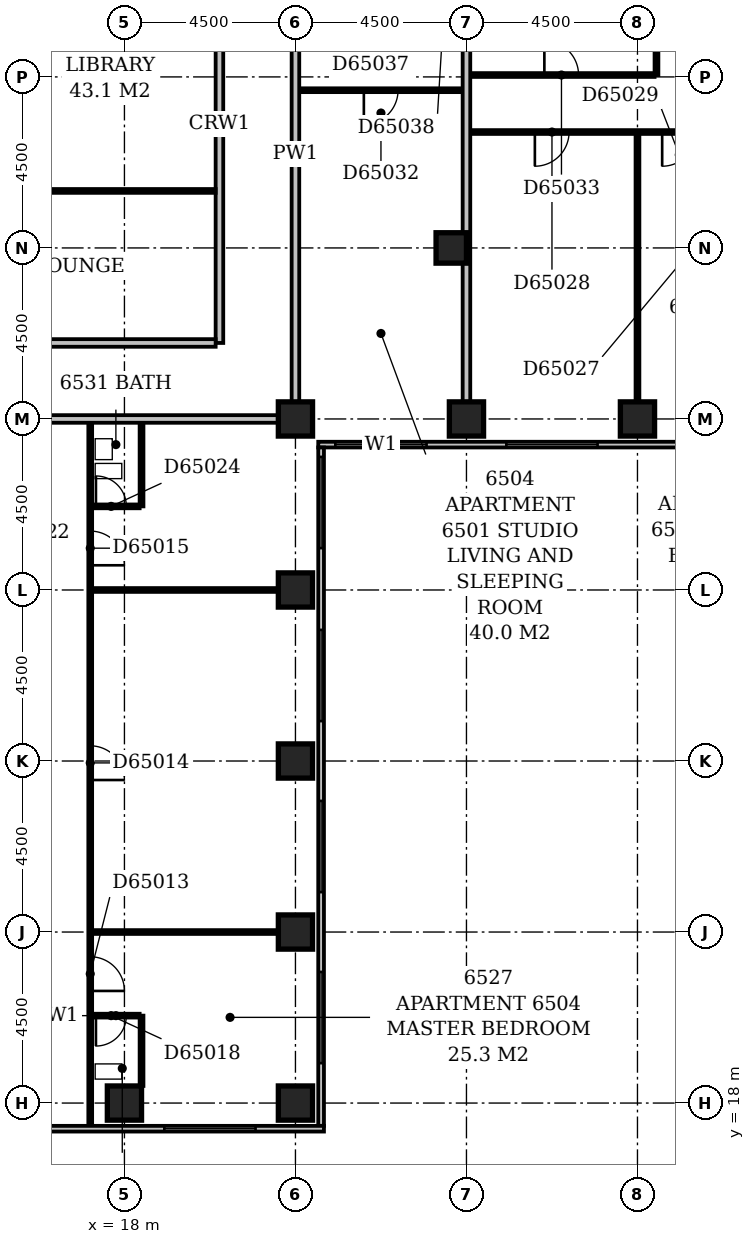
"""IFC4 building model, lengths in metres.
Left out: names, types, materials, properties, quantities, classifications, styles, units other than length and angle.
Written with IfcOpenShell. Run it as: python <this file> out.ifc"""

import sys

from ifc_helpers import new_model, si_unit, direction, frame, frame_2d, origin, origin_2d, place, context, subcontext, project, spatial, rectangle, extrude, element, fill, save


model = new_model("IFC4")
c1 = context("Model", 3, precision=1e-05, world=origin(), true_north=direction((0.0, 1.0)))
c2 = subcontext(c1, "Body", "Model", "MODEL_VIEW")
j1 = project(units=[si_unit("LENGTHUNIT", "METRE"), si_unit("PLANEANGLEUNIT", "RADIAN")], contexts=[c1])
p1 = place(None, origin())
s1 = spatial("IfcSite", under=j1, at=p1, CompositionType="ELEMENT")
p2 = place(p1, origin())
s2 = spatial("IfcBuilding", under=s1, at=p2, CompositionType="ELEMENT")
p3 = place(p2, frame((0.0, 0.0, 251.0)))
s3 = spatial("IfcBuildingStorey", under=s2, at=p3, CompositionType="ELEMENT", Elevation=251.0)
for number, where, z_axis, x_axis in (
    (1, (18.0, 18.0, -0.3), (0.0, 0.0, 1.0), (1.0, 0.0, 0.0)),
    (2, (22.5, 18.0, -0.3), (0.0, 0.0, 1.0), (1.0, 0.0, 0.0)),
    (3, (22.5, 22.5, -0.3), (0.0, 0.0, 1.0), (1.0, 0.0, 0.0)),
    (4, (22.5, 27.0, -0.3), (0.0, 0.0, 1.0), (1.0, 0.0, 0.0)),
    (5, (22.5, 31.5, -0.3), (0.0, 0.0, 1.0), (1.0, 0.0, 0.0)),
    (6, (22.5, 36.0, -0.3), (0.0, 0.0, 1.0), (1.0, 0.0, 0.0)),
    (7, (27.0, 36.0, -0.3), (0.0, 0.0, 1.0), (1.0, 0.0, 0.0)),
    (8, (31.5, 36.0, -0.3), (0.0, 0.0, 1.0), (1.0, 0.0, 0.0)),
):
    element("IfcColumn", number, at=place(p3, frame(where, z_axis=z_axis, x_axis=x_axis)), inside=s3, PredefinedType="COLUMN", context=c2, shape_type="SweptSolid", body=[
        extrude(rectangle(XDim=0.9, YDim=0.9, at=origin_2d()), origin(), (0.0, 0.0, 1.0), 3.6),
    ])
p4 = place(p3, frame((26.6, 40.5, -0.3), z_axis=(0.0, 0.0, 1.0), x_axis=(1.0, 0.0, 0.0)))
e9 = element("IfcColumn", 9, at=p4, inside=s3, PredefinedType="COLUMN", context=c2, shape_type="SweptSolid", body=[
    extrude(rectangle(XDim=0.8, YDim=0.8, at=origin_2d()), origin(), (0.0, 0.0, 1.0), 3.6),
])
p5 = place(p3, frame((3.9, 17.325, 0.0), z_axis=(0.0, 0.0, 1.0), x_axis=(1.0, 0.0, 0.0)))
e10 = element("IfcWall", 10, at=p5, inside=s3, PredefinedType="STANDARD", context=c2, shape_type="SweptSolid", body=[
    extrude(rectangle(XDim=19.35, YDim=0.15, at=frame_2d((9.675, 0.0))), origin(), (0.0, 0.0, 1.0), 2.7),
])
p6 = place(p5, frame((6.15, 0.0, 0.6)))
e11 = element("IfcOpeningElement", 11, at=p6, cuts=e10, PredefinedType="OPENING", context=c2, shape_type="SweptSolid", body=[
    extrude(rectangle(XDim=2.4, YDim=1.8, at=frame_2d((1.2, 0.9))), frame((0.0, 0.087, 0.0), z_axis=(0.0, -1.0, 0.0), x_axis=(1.0, 0.0, 0.0)), (0.0, 0.0, 1.0), 0.174),
])
p7 = place(p5, frame((15.15, 0.0, 0.6)))
e12 = element("IfcOpeningElement", 12, at=p7, cuts=e10, PredefinedType="OPENING", context=c2, shape_type="SweptSolid", body=[
    extrude(rectangle(XDim=2.4, YDim=1.8, at=frame_2d((1.2, 0.9))), frame((0.0, 0.087, 0.0), z_axis=(0.0, -1.0, 0.0), x_axis=(1.0, 0.0, 0.0)), (0.0, 0.0, 1.0), 0.174),
])
p8 = place(p3, frame((23.175, 17.4, 0.0), z_axis=(0.0, 0.0, 1.0), x_axis=(0.0, 1.0, 0.0)))
e13 = element("IfcWall", 13, at=p8, inside=s3, PredefinedType="STANDARD", context=c2, shape_type="SweptSolid", body=[
    extrude(rectangle(XDim=17.85, YDim=0.15, at=frame_2d((8.925, 0.0))), origin(), (0.0, 0.0, 1.0), 2.7),
])
p9 = place(p8, frame((1.65, 0.0, 0.6)))
e14 = element("IfcOpeningElement", 14, at=p9, cuts=e13, PredefinedType="OPENING", context=c2, shape_type="SweptSolid", body=[
    extrude(rectangle(XDim=2.4, YDim=1.8, at=frame_2d((1.2, 0.9))), frame((0.0, 0.087, 0.0), z_axis=(0.0, -1.0, 0.0), x_axis=(1.0, 0.0, 0.0)), (0.0, 0.0, 1.0), 0.174),
])
p10 = place(p8, frame((6.15, 0.0, 0.6)))
e15 = element("IfcOpeningElement", 15, at=p10, cuts=e13, PredefinedType="OPENING", context=c2, shape_type="SweptSolid", body=[
    extrude(rectangle(XDim=2.4, YDim=1.8, at=frame_2d((1.2, 0.9))), frame((0.0, 0.087, 0.0), z_axis=(0.0, -1.0, 0.0), x_axis=(1.0, 0.0, 0.0)), (0.0, 0.0, 1.0), 0.174),
])
p11 = place(p8, frame((10.65, 0.0, 0.6)))
e16 = element("IfcOpeningElement", 16, at=p11, cuts=e13, PredefinedType="OPENING", context=c2, shape_type="SweptSolid", body=[
    extrude(rectangle(XDim=2.4, YDim=1.8, at=frame_2d((1.2, 0.9))), frame((0.0, 0.087, 0.0), z_axis=(0.0, -1.0, 0.0), x_axis=(1.0, 0.0, 0.0)), (0.0, 0.0, 1.0), 0.174),
])
p12 = place(p8, frame((15.202, 0.0, 0.6)))
e17 = element("IfcOpeningElement", 17, at=p12, cuts=e13, PredefinedType="OPENING", context=c2, shape_type="SweptSolid", body=[
    extrude(rectangle(XDim=2.4, YDim=1.8, at=frame_2d((1.2, 0.9))), frame((0.0, 0.087, 0.0), z_axis=(0.0, -1.0, 0.0), x_axis=(1.0, 0.0, 0.0)), (0.0, 0.0, 1.0), 0.174),
])
p13 = place(p3, frame((23.1, 35.325, 0.0), z_axis=(0.0, 0.0, 1.0), x_axis=(1.0, 0.0, 0.0)))
e18 = element("IfcWall", 18, at=p13, inside=s3, PredefinedType="STANDARD", context=c2, shape_type="SweptSolid", body=[
    extrude(rectangle(XDim=18.15, YDim=0.15, at=frame_2d((9.075, 0.0))), origin(), (0.0, 0.0, 1.0), 2.7),
])
p14 = place(p13, frame((0.45, 0.0, 0.6)))
e19 = element("IfcOpeningElement", 19, at=p14, cuts=e18, PredefinedType="OPENING", context=c2, shape_type="SweptSolid", body=[
    extrude(rectangle(XDim=2.4, YDim=1.8, at=frame_2d((1.2, 0.9))), frame((0.0, 0.087, 0.0), z_axis=(0.0, -1.0, 0.0), x_axis=(1.0, 0.0, 0.0)), (0.0, 0.0, 1.0), 0.174),
])
p15 = place(p13, frame((4.95, 0.0, 0.6)))
e20 = element("IfcOpeningElement", 20, at=p15, cuts=e18, PredefinedType="OPENING", context=c2, shape_type="SweptSolid", body=[
    extrude(rectangle(XDim=2.4, YDim=1.8, at=frame_2d((1.2, 0.9))), frame((0.0, 0.087, 0.0), z_axis=(0.0, -1.0, 0.0), x_axis=(1.0, 0.0, 0.0)), (0.0, 0.0, 1.0), 0.174),
])
p16 = place(p13, frame((9.45, 0.0, 0.6)))
e21 = element("IfcOpeningElement", 21, at=p16, cuts=e18, PredefinedType="OPENING", context=c2, shape_type="SweptSolid", body=[
    extrude(rectangle(XDim=2.4, YDim=1.8, at=frame_2d((1.2, 0.9))), frame((0.0, 0.087, 0.0), z_axis=(0.0, -1.0, 0.0), x_axis=(1.0, 0.0, 0.0)), (0.0, 0.0, 1.0), 0.174),
])
p17 = place(p13, frame((14.931, 0.0, 0.6)))
e22 = element("IfcOpeningElement", 22, at=p17, cuts=e18, PredefinedType="OPENING", context=c2, shape_type="SweptSolid", body=[
    extrude(rectangle(XDim=1.8, YDim=1.8, at=frame_2d((0.9, 0.9))), frame((0.0, 0.087, 0.0), z_axis=(0.0, -1.0, 0.0), x_axis=(1.0, 0.0, 0.0)), (0.0, 0.0, 1.0), 0.174),
])
p18 = place(p3, frame((17.1, 17.4, 0.0), z_axis=(0.0, 0.0, 1.0), x_axis=(0.0, 1.0, 0.0)))
e23 = element("IfcWall", 23, at=p18, inside=s3, PredefinedType="PARTITIONING", context=c2, shape_type="SweptSolid", body=[
    extrude(rectangle(XDim=18.5, YDim=0.1, at=frame_2d((9.25, 0.0))), origin(), (0.0, 0.0, 1.0), 3.3),
])
p19 = place(p18, frame((3.55, 0.0, 0.0)))
e24 = element("IfcOpeningElement", 24, at=p19, cuts=e23, PredefinedType="OPENING", context=c2, shape_type="SweptSolid", body=[
    extrude(rectangle(XDim=0.9, YDim=2.1, at=frame_2d((0.45, 1.05))), frame((0.0, 0.062, 0.0), z_axis=(0.0, -1.0, 0.0), x_axis=(1.0, 0.0, 0.0)), (0.0, 0.0, 1.0), 0.124),
])
p20 = place(p18, frame((9.1, 0.0, 0.0)))
e25 = element("IfcOpeningElement", 25, at=p20, cuts=e23, PredefinedType="OPENING", context=c2, shape_type="SweptSolid", body=[
    extrude(rectangle(XDim=0.9, YDim=2.1, at=frame_2d((0.45, 1.05))), frame((0.0, 0.062, 0.0), z_axis=(0.0, -1.0, 0.0), x_axis=(1.0, 0.0, 0.0)), (0.0, 0.0, 1.0), 0.124),
])
p21 = place(p18, frame((14.75, 0.0, 0.0)))
e26 = element("IfcOpeningElement", 26, at=p21, cuts=e23, PredefinedType="OPENING", context=c2, shape_type="SweptSolid", body=[
    extrude(rectangle(XDim=0.9, YDim=2.1, at=frame_2d((0.45, 1.05))), frame((0.0, 0.062, 0.0), z_axis=(0.0, -1.0, 0.0), x_axis=(1.0, 0.0, 0.0)), (0.0, 0.0, 1.0), 0.124),
])
p22 = place(p3, frame((18.45, 18.45, 0.0), z_axis=(0.0, 0.0, 1.0), x_axis=(0.0, 1.0, 0.0)))
e27 = element("IfcWall", 27, at=p22, inside=s3, PredefinedType="PLUMBINGWALL", context=c2, shape_type="SweptSolid", body=[
    extrude(rectangle(XDim=1.85, YDim=0.1, at=frame_2d((0.925, 0.0))), origin(), (0.0, 0.0, 1.0), 3.3),
])
p23 = place(p3, frame((17.15, 20.3, 0.0), z_axis=(0.0, 0.0, 1.0), x_axis=(1.0, 0.0, 0.0)))
e28 = element("IfcWall", 28, at=p23, inside=s3, PredefinedType="PLUMBINGWALL", context=c2, shape_type="SweptSolid", body=[
    extrude(rectangle(XDim=1.25, YDim=0.1, at=frame_2d((0.625, 0.0))), origin(), (0.0, 0.0, 1.0), 3.3),
])
p24 = place(p23, frame((0.1, 0.0, 0.0)))
e29 = element("IfcOpeningElement", 29, at=p24, cuts=e28, PredefinedType="OPENING", context=c2, shape_type="SweptSolid", body=[
    extrude(rectangle(XDim=0.8, YDim=2.1, at=frame_2d((0.4, 1.05))), frame((0.0, 0.062, 0.0), z_axis=(0.0, -1.0, 0.0), x_axis=(1.0, 0.0, 0.0)), (0.0, 0.0, 1.0), 0.124),
])
for number, where, z_axis, x_axis in (
    (30, (17.15, 22.5, 0.0), (0.0, 0.0, 1.0), (1.0, 0.0, 0.0)),
    (31, (17.15, 31.5, 0.0), (0.0, 0.0, 1.0), (1.0, 0.0, 0.0)),
):
    element("IfcWall", number, at=place(p3, frame(where, z_axis=z_axis, x_axis=x_axis)), inside=s3, PredefinedType="PARTITIONING", context=c2, shape_type="SweptSolid", body=[
        extrude(rectangle(XDim=4.9, YDim=0.1, at=frame_2d((2.45, 0.0))), origin(), (0.0, 0.0, 1.0), 3.3),
    ])
p25 = place(p3, frame((17.15, 33.7, 0.0), z_axis=(0.0, 0.0, 1.0), x_axis=(1.0, 0.0, 0.0)))
e32 = element("IfcWall", 32, at=p25, inside=s3, PredefinedType="PLUMBINGWALL", context=c2, shape_type="SweptSolid", body=[
    extrude(rectangle(XDim=1.25, YDim=0.1, at=frame_2d((0.625, 0.0))), origin(), (0.0, 0.0, 1.0), 3.3),
])
p26 = place(p25, frame((0.1, 0.0, 0.0)))
e33 = element("IfcOpeningElement", 33, at=p26, cuts=e32, PredefinedType="OPENING", context=c2, shape_type="SweptSolid", body=[
    extrude(rectangle(XDim=0.8, YDim=2.1, at=frame_2d((0.4, 1.05))), frame((0.0, 0.062, 0.0), z_axis=(0.0, -1.0, 0.0), x_axis=(1.0, 0.0, 0.0)), (0.0, 0.0, 1.0), 0.124),
])
p27 = place(p3, frame((18.45, 33.7, 0.0), z_axis=(0.0, 0.0, 1.0), x_axis=(0.0, 1.0, 0.0)))
e34 = element("IfcWall", 34, at=p27, inside=s3, PredefinedType="PLUMBINGWALL", context=c2, shape_type="SweptSolid", body=[
    extrude(rectangle(XDim=2.2, YDim=0.1, at=frame_2d((1.1, 0.0))), origin(), (0.0, 0.0, 1.0), 3.3),
])
p28 = place(p3, frame((9.1, 36.0, 0.0), z_axis=(0.0, 0.0, 1.0), x_axis=(1.0, 0.0, 0.0)))
e35 = element("IfcWall", 35, at=p28, inside=s3, PredefinedType="PARTITIONING", context=c2, shape_type="SweptSolid", body=[
    extrude(rectangle(XDim=12.95, YDim=0.2, at=frame_2d((6.475, 0.0))), origin(), (0.0, 0.0, 1.0), 3.3),
])
p29 = place(p3, frame((22.5, 36.45, 0.0), z_axis=(0.0, 0.0, 1.0), x_axis=(0.0, 1.0, 0.0)))
e36 = element("IfcWall", 36, at=p29, inside=s3, PredefinedType="PARTITIONING", context=c2, shape_type="SweptSolid", body=[
    extrude(rectangle(XDim=13.05, YDim=0.2, at=frame_2d((6.525, 0.0))), origin(), (0.0, 0.0, 1.0), 3.3),
])
p30 = place(p3, frame((27.0, 36.45, 0.0), z_axis=(0.0, 0.0, 1.0), x_axis=(0.0, 1.0, 0.0)))
e37 = element("IfcWall", 37, at=p30, inside=s3, PredefinedType="PARTITIONING", context=c2, shape_type="SweptSolid", body=[
    extrude(rectangle(XDim=12.95, YDim=0.2, at=frame_2d((6.475, 0.0))), origin(), (0.0, 0.0, 1.0), 3.3),
])
p31 = place(p3, frame((31.5, 36.45, 0.0), z_axis=(0.0, 0.0, 1.0), x_axis=(0.0, 1.0, 0.0)))
e38 = element("IfcWall", 38, at=p31, inside=s3, PredefinedType="PARTITIONING", context=c2, shape_type="SweptSolid", body=[
    extrude(rectangle(XDim=7.05, YDim=0.1, at=frame_2d((3.525, 0.0))), origin(), (0.0, 0.0, 1.0), 3.3),
])
p32 = place(p3, frame((9.1, 38.0, 0.0), z_axis=(0.0, 0.0, 1.0), x_axis=(1.0, 0.0, 0.0)))
e39 = element("IfcWall", 39, at=p32, inside=s3, PredefinedType="PARTITIONING", context=c2, shape_type="SweptSolid", body=[
    extrude(rectangle(XDim=11.3, YDim=0.2, at=frame_2d((5.65, 0.0))), origin(), (0.0, 0.0, 1.0), 3.3),
])
p33 = place(p3, frame((20.5, 38.0, 0.0), z_axis=(0.0, 0.0, 1.0), x_axis=(0.0, 1.0, 0.0)))
e40 = element("IfcWall", 40, at=p33, inside=s3, PredefinedType="PARTITIONING", context=c2, shape_type="SweptSolid", body=[
    extrude(rectangle(XDim=11.5, YDim=0.2, at=frame_2d((5.75, 0.0))), origin(), (0.0, 0.0, 1.0), 3.3),
])
p34 = place(p3, frame((9.1, 42.0, 0.0), z_axis=(0.0, 0.0, 1.0), x_axis=(1.0, 0.0, 0.0)))
e41 = element("IfcWall", 41, at=p34, inside=s3, PredefinedType="PARTITIONING", context=c2, shape_type="SweptSolid", body=[
    extrude(rectangle(XDim=11.3, YDim=0.1, at=frame_2d((5.65, 0.0))), origin(), (0.0, 0.0, 1.0), 3.3),
])
p35 = place(p3, frame((27.1, 43.55, 0.0), z_axis=(0.0, 0.0, 1.0), x_axis=(1.0, 0.0, 0.0)))
e42 = element("IfcWall", 42, at=p35, inside=s3, PredefinedType="PARTITIONING", context=c2, shape_type="SweptSolid", body=[
    extrude(rectangle(XDim=8.8, YDim=0.1, at=frame_2d((4.4, 0.0))), origin(), (0.0, 0.0, 1.0), 3.3),
])
p36 = place(p35, frame((1.7, 0.0, 0.0)))
e43 = element("IfcOpeningElement", 43, at=p36, cuts=e42, PredefinedType="OPENING", context=c2, shape_type="SweptSolid", body=[
    extrude(rectangle(XDim=0.9, YDim=2.1, at=frame_2d((0.45, 1.05))), frame((0.0, 0.062, 0.0), z_axis=(0.0, -1.0, 0.0), x_axis=(1.0, 0.0, 0.0)), (0.0, 0.0, 1.0), 0.124),
])
p37 = place(p35, frame((5.05, 0.0, 0.0)))
e44 = element("IfcOpeningElement", 44, at=p37, cuts=e42, PredefinedType="OPENING", context=c2, shape_type="SweptSolid", body=[
    extrude(rectangle(XDim=0.9, YDim=2.1, at=frame_2d((0.45, 1.05))), frame((0.0, 0.062, 0.0), z_axis=(0.0, -1.0, 0.0), x_axis=(1.0, 0.0, 0.0)), (0.0, 0.0, 1.0), 0.124),
])
p38 = place(p3, frame((22.6, 44.65, 0.0), z_axis=(0.0, 0.0, 1.0), x_axis=(1.0, 0.0, 0.0)))
e45 = element("IfcWall", 45, at=p38, inside=s3, PredefinedType="PARTITIONING", context=c2, shape_type="SweptSolid", body=[
    extrude(rectangle(XDim=4.3, YDim=0.1, at=frame_2d((2.15, 0.0))), origin(), (0.0, 0.0, 1.0), 3.3),
])
p39 = place(p38, frame((1.7, 0.0, 0.0)))
e46 = element("IfcOpeningElement", 46, at=p39, cuts=e45, PredefinedType="OPENING", context=c2, shape_type="SweptSolid", body=[
    extrude(rectangle(XDim=0.9, YDim=2.1, at=frame_2d((0.45, 1.05))), frame((0.0, 0.062, 0.0), z_axis=(0.0, -1.0, 0.0), x_axis=(1.0, 0.0, 0.0)), (0.0, 0.0, 1.0), 0.124),
])
p40 = place(p3, frame((27.1, 45.05, 0.0), z_axis=(0.0, 0.0, 1.0), x_axis=(1.0, 0.0, 0.0)))
e47 = element("IfcWall", 47, at=p40, inside=s3, PredefinedType="PARTITIONING", context=c2, shape_type="SweptSolid", body=[
    extrude(rectangle(XDim=4.85, YDim=0.1, at=frame_2d((2.425, 0.0))), origin(), (0.0, 0.0, 1.0), 3.3),
])
p41 = place(p40, frame((1.95, 0.0, 0.0)))
e48 = element("IfcOpeningElement", 48, at=p41, cuts=e47, PredefinedType="OPENING", context=c2, shape_type="SweptSolid", body=[
    extrude(rectangle(XDim=0.9, YDim=2.1, at=frame_2d((0.45, 1.05))), frame((0.0, 0.062, 0.0), z_axis=(0.0, -1.0, 0.0), x_axis=(1.0, 0.0, 0.0)), (0.0, 0.0, 1.0), 0.124),
])
p42 = place(p3, frame((32.0, 45.05, 0.0), z_axis=(0.0, 0.0, 1.0), x_axis=(0.0, 1.0, 0.0)))
e49 = element("IfcWall", 49, at=p42, inside=s3, PredefinedType="PARTITIONING", context=c2, shape_type="SweptSolid", body=[
    extrude(rectangle(XDim=4.35, YDim=0.1, at=frame_2d((2.175, 0.0))), origin(), (0.0, 0.0, 1.0), 3.3),
])
p43 = place(p7, origin())
e50 = element("IfcWindow", 50, at=p43, inside=s3, PartitioningType="SINGLE_PANEL", PredefinedType="WINDOW", context=c2, shape_type="SweptSolid", body=[
    extrude(rectangle(XDim=2.4, YDim=1.8, at=frame_2d((1.2, 0.9))), frame((0.0, 0.03, 0.0), z_axis=(0.0, -1.0, 0.0), x_axis=(1.0, 0.0, 0.0)), (0.0, 0.0, 1.0), 0.06),
])
fill(e12, e50)
p44 = place(p9, origin())
e51 = element("IfcWindow", 51, at=p44, inside=s3, PartitioningType="SINGLE_PANEL", PredefinedType="WINDOW", context=c2, shape_type="SweptSolid", body=[
    extrude(rectangle(XDim=2.4, YDim=1.8, at=frame_2d((1.2, 0.9))), frame((0.0, 0.03, 0.0), z_axis=(0.0, -1.0, 0.0), x_axis=(1.0, 0.0, 0.0)), (0.0, 0.0, 1.0), 0.06),
])
fill(e14, e51)
p45 = place(p10, origin())
e52 = element("IfcWindow", 52, at=p45, inside=s3, PartitioningType="SINGLE_PANEL", PredefinedType="WINDOW", context=c2, shape_type="SweptSolid", body=[
    extrude(rectangle(XDim=2.4, YDim=1.8, at=frame_2d((1.2, 0.9))), frame((0.0, 0.03, 0.0), z_axis=(0.0, -1.0, 0.0), x_axis=(1.0, 0.0, 0.0)), (0.0, 0.0, 1.0), 0.06),
])
fill(e15, e52)
p46 = place(p11, origin())
e53 = element("IfcWindow", 53, at=p46, inside=s3, PartitioningType="SINGLE_PANEL", PredefinedType="WINDOW", context=c2, shape_type="SweptSolid", body=[
    extrude(rectangle(XDim=2.4, YDim=1.8, at=frame_2d((1.2, 0.9))), frame((0.0, 0.03, 0.0), z_axis=(0.0, -1.0, 0.0), x_axis=(1.0, 0.0, 0.0)), (0.0, 0.0, 1.0), 0.06),
])
fill(e16, e53)
p47 = place(p12, origin())
e54 = element("IfcWindow", 54, at=p47, inside=s3, PartitioningType="SINGLE_PANEL", PredefinedType="WINDOW", context=c2, shape_type="SweptSolid", body=[
    extrude(rectangle(XDim=2.4, YDim=1.8, at=frame_2d((1.2, 0.9))), frame((0.0, 0.03, 0.0), z_axis=(0.0, -1.0, 0.0), x_axis=(1.0, 0.0, 0.0)), (0.0, 0.0, 1.0), 0.06),
])
fill(e17, e54)
p48 = place(p14, origin())
e55 = element("IfcWindow", 55, at=p48, inside=s3, PartitioningType="SINGLE_PANEL", PredefinedType="WINDOW", context=c2, shape_type="SweptSolid", body=[
    extrude(rectangle(XDim=2.4, YDim=1.8, at=frame_2d((1.2, 0.9))), frame((0.0, 0.03, 0.0), z_axis=(0.0, -1.0, 0.0), x_axis=(1.0, 0.0, 0.0)), (0.0, 0.0, 1.0), 0.06),
])
fill(e19, e55)
p49 = place(p15, origin())
e56 = element("IfcWindow", 56, at=p49, inside=s3, PartitioningType="SINGLE_PANEL", PredefinedType="WINDOW", context=c2, shape_type="SweptSolid", body=[
    extrude(rectangle(XDim=2.4, YDim=1.8, at=frame_2d((1.2, 0.9))), frame((0.0, 0.03, 0.0), z_axis=(0.0, -1.0, 0.0), x_axis=(1.0, 0.0, 0.0)), (0.0, 0.0, 1.0), 0.06),
])
fill(e20, e56)
p50 = place(p19, frame((0.9, 0.0, 0.0), z_axis=(0.0, 0.0, 1.0), x_axis=(-1.0, 0.0, 0.0)))
e57 = element("IfcDoor", 57, at=p50, inside=s3, OperationType="SINGLE_SWING_RIGHT", PredefinedType="DOOR", context=c2, shape_type="SweptSolid", body=[
    extrude(rectangle(XDim=0.9, YDim=2.1, at=frame_2d((0.45, 1.05))), frame((0.0, 0.025, 0.0), z_axis=(0.0, -1.0, 0.0), x_axis=(1.0, 0.0, 0.0)), (0.0, 0.0, 1.0), 0.05),
])
fill(e24, e57)
p51 = place(p20, frame((0.9, 0.0, 0.0), z_axis=(0.0, 0.0, 1.0), x_axis=(-1.0, 0.0, 0.0)))
e58 = element("IfcDoor", 58, at=p51, inside=s3, OperationType="SINGLE_SWING_RIGHT", PredefinedType="DOOR", context=c2, shape_type="SweptSolid", body=[
    extrude(rectangle(XDim=0.9, YDim=2.1, at=frame_2d((0.45, 1.05))), frame((0.0, 0.025, 0.0), z_axis=(0.0, -1.0, 0.0), x_axis=(1.0, 0.0, 0.0)), (0.0, 0.0, 1.0), 0.05),
])
fill(e25, e58)
p52 = place(p21, frame((0.9, 0.0, 0.0), z_axis=(0.0, 0.0, 1.0), x_axis=(-1.0, 0.0, 0.0)))
e59 = element("IfcDoor", 59, at=p52, inside=s3, OperationType="SINGLE_SWING_RIGHT", PredefinedType="DOOR", context=c2, shape_type="SweptSolid", body=[
    extrude(rectangle(XDim=0.9, YDim=2.1, at=frame_2d((0.45, 1.05))), frame((0.0, 0.025, 0.0), z_axis=(0.0, -1.0, 0.0), x_axis=(1.0, 0.0, 0.0)), (0.0, 0.0, 1.0), 0.05),
])
fill(e26, e59)
p53 = place(p24, frame((0.8, 0.0, 0.0), z_axis=(0.0, 0.0, 1.0), x_axis=(-1.0, 0.0, 0.0)))
e60 = element("IfcDoor", 60, at=p53, inside=s3, OperationType="SINGLE_SWING_RIGHT", PredefinedType="DOOR", context=c2, shape_type="SweptSolid", body=[
    extrude(rectangle(XDim=0.8, YDim=2.1, at=frame_2d((0.4, 1.05))), frame((0.0, 0.025, 0.0), z_axis=(0.0, -1.0, 0.0), x_axis=(1.0, 0.0, 0.0)), (0.0, 0.0, 1.0), 0.05),
])
fill(e29, e60)
p54 = place(p26, origin())
e61 = element("IfcDoor", 61, at=p54, inside=s3, OperationType="SINGLE_SWING_LEFT", PredefinedType="DOOR", context=c2, shape_type="SweptSolid", body=[
    extrude(rectangle(XDim=0.8, YDim=2.1, at=frame_2d((0.4, 1.05))), frame((0.0, 0.025, 0.0), z_axis=(0.0, -1.0, 0.0), x_axis=(1.0, 0.0, 0.0)), (0.0, 0.0, 1.0), 0.05),
])
fill(e33, e61)
p55 = place(p36, frame((0.9, 0.0, 0.0), z_axis=(0.0, 0.0, 1.0), x_axis=(-1.0, 0.0, 0.0)))
e62 = element("IfcDoor", 62, at=p55, inside=s3, OperationType="SINGLE_SWING_RIGHT", PredefinedType="DOOR", context=c2, shape_type="SweptSolid", body=[
    extrude(rectangle(XDim=0.9, YDim=2.1, at=frame_2d((0.45, 1.05))), frame((0.0, 0.025, 0.0), z_axis=(0.0, -1.0, 0.0), x_axis=(1.0, 0.0, 0.0)), (0.0, 0.0, 1.0), 0.05),
])
fill(e43, e62)
p56 = place(p37, frame((0.9, 0.0, 0.0), z_axis=(0.0, 0.0, 1.0), x_axis=(-1.0, 0.0, 0.0)))
e63 = element("IfcDoor", 63, at=p56, inside=s3, OperationType="SINGLE_SWING_RIGHT", PredefinedType="DOOR", context=c2, shape_type="SweptSolid", body=[
    extrude(rectangle(XDim=0.9, YDim=2.1, at=frame_2d((0.45, 1.05))), frame((0.0, 0.025, 0.0), z_axis=(0.0, -1.0, 0.0), x_axis=(1.0, 0.0, 0.0)), (0.0, 0.0, 1.0), 0.05),
])
fill(e44, e63)
p57 = place(p39, frame((0.9, 0.0, 0.0), z_axis=(0.0, 0.0, 1.0), x_axis=(-1.0, 0.0, 0.0)))
e64 = element("IfcDoor", 64, at=p57, inside=s3, OperationType="SINGLE_SWING_RIGHT", PredefinedType="DOOR", context=c2, shape_type="SweptSolid", body=[
    extrude(rectangle(XDim=0.9, YDim=2.1, at=frame_2d((0.45, 1.05))), frame((0.0, 0.025, 0.0), z_axis=(0.0, -1.0, 0.0), x_axis=(1.0, 0.0, 0.0)), (0.0, 0.0, 1.0), 0.05),
])
fill(e46, e64)
p58 = place(p41, origin())
e65 = element("IfcDoor", 65, at=p58, inside=s3, OperationType="SINGLE_SWING_LEFT", PredefinedType="DOOR", context=c2, shape_type="SweptSolid", body=[
    extrude(rectangle(XDim=0.9, YDim=2.1, at=frame_2d((0.45, 1.05))), frame((0.0, 0.025, 0.0), z_axis=(0.0, -1.0, 0.0), x_axis=(1.0, 0.0, 0.0)), (0.0, 0.0, 1.0), 0.05),
])
fill(e48, e65)
save(model, sys.argv[1])
